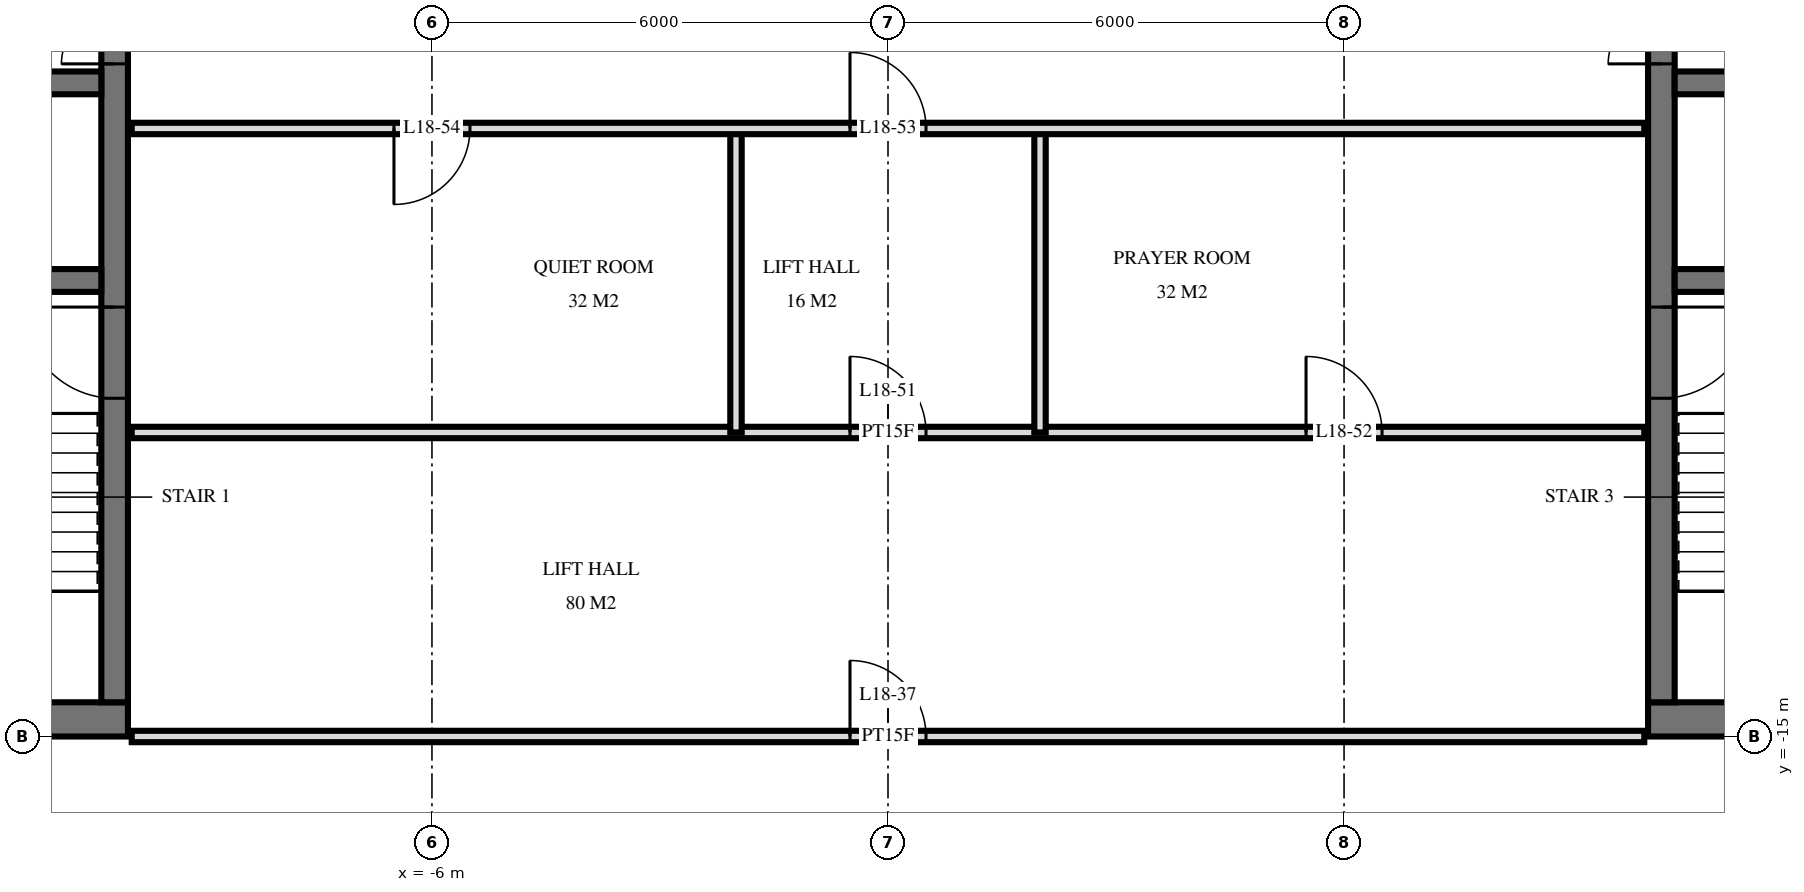
"""IFC4 building model, lengths in metres.
Left out: names, types, materials, properties, quantities, classifications, styles, units other than length and angle.
Written with IfcOpenShell. Run it as: python <this file> out.ifc"""

import sys

from ifc_helpers import new_model, si_unit, direction, frame, frame_2d, origin, place, context, subcontext, project, spatial, rectangle, extrude, element, fill, save


model = new_model("IFC4")
c1 = context("Model", 3, precision=1e-05, world=origin(), true_north=direction((0.0, 1.0)))
c2 = subcontext(c1, "Body", "Model", "MODEL_VIEW")
j1 = project(units=[si_unit("LENGTHUNIT", "METRE"), si_unit("PLANEANGLEUNIT", "RADIAN")], contexts=[c1])
p1 = place(None, origin())
s1 = spatial("IfcSite", under=j1, at=p1, CompositionType="ELEMENT")
p2 = place(p1, origin())
s2 = spatial("IfcBuilding", under=s1, at=p2, CompositionType="ELEMENT")
p3 = place(p2, frame((0.0, 0.0, 74.4)))
s3 = spatial("IfcBuildingStorey", under=s2, at=p3, CompositionType="ELEMENT", Elevation=74.4)
p4 = place(p3, frame((-29.5, -14.775, 0.0), z_axis=(0.0, 0.0, 1.0), x_axis=(1.0, 0.0, 0.0)))
e1 = element("IfcWall", 1, at=p4, inside=s3, PredefinedType="SHEAR", context=c2, shape_type="SweptSolid", body=[
    extrude(rectangle(XDim=19.5, YDim=0.45, at=frame_2d((9.75, 0.0))), origin(), (0.0, 0.0, 1.0), 3.6),
])
p5 = place(p4, frame((11.2, 0.0, 0.0)))
e2 = element("IfcOpeningElement", 2, at=p5, cuts=e1, PredefinedType="OPENING", context=c2, shape_type="SweptSolid", body=[
    extrude(rectangle(XDim=1.2, YDim=2.1, at=frame_2d((0.6, 1.05))), frame((0.0, 0.235, 0.0), z_axis=(0.0, -1.0, 0.0), x_axis=(1.0, 0.0, 0.0)), (0.0, 0.0, 1.0), 0.47),
])
p6 = place(p4, frame((14.25, 0.0, 0.0)))
e3 = element("IfcOpeningElement", 3, at=p6, cuts=e1, PredefinedType="OPENING", context=c2, shape_type="SweptSolid", body=[
    extrude(rectangle(XDim=1.1, YDim=2.1, at=frame_2d((0.55, 1.05))), frame((0.0, 0.235, 0.0), z_axis=(0.0, -1.0, 0.0), x_axis=(1.0, 0.0, 0.0)), (0.0, 0.0, 1.0), 0.47),
])
p7 = place(p4, frame((8.5, 0.0, 0.0)))
e4 = element("IfcOpeningElement", 4, at=p7, cuts=e1, PredefinedType="OPENING", context=c2, shape_type="SweptSolid", body=[
    extrude(rectangle(XDim=0.9, YDim=2.1, at=frame_2d((0.45, 1.05))), frame((0.0, 0.235, 0.0), z_axis=(0.0, -1.0, 0.0), x_axis=(1.0, 0.0, 0.0)), (0.0, 0.0, 1.0), 0.47),
])
p8 = place(p4, frame((6.05, 0.0, 0.0)))
e5 = element("IfcOpeningElement", 5, at=p8, cuts=e1, PredefinedType="OPENING", context=c2, shape_type="SweptSolid", body=[
    extrude(rectangle(XDim=1.0, YDim=2.1, at=frame_2d((0.5, 1.05))), frame((0.0, 0.235, 0.0), z_axis=(0.0, -1.0, 0.0), x_axis=(1.0, 0.0, 0.0)), (0.0, 0.0, 1.0), 0.47),
])
p9 = place(p4, frame((2.988, 0.0, 0.0)))
e6 = element("IfcOpeningElement", 6, at=p9, cuts=e1, PredefinedType="OPENING", context=c2, shape_type="SweptSolid", body=[
    extrude(rectangle(XDim=1.0, YDim=2.1, at=frame_2d((0.5, 1.05))), frame((0.0, 0.235, 0.0), z_axis=(0.0, -1.0, 0.0), x_axis=(1.0, 0.0, 0.0)), (0.0, 0.0, 1.0), 0.47),
])
p10 = place(p4, frame((0.663, 0.0, 0.0)))
e7 = element("IfcOpeningElement", 7, at=p10, cuts=e1, PredefinedType="OPENING", context=c2, shape_type="SweptSolid", body=[
    extrude(rectangle(XDim=1.0, YDim=2.1, at=frame_2d((0.5, 1.05))), frame((0.0, 0.235, 0.0), z_axis=(0.0, -1.0, 0.0), x_axis=(1.0, 0.0, 0.0)), (0.0, 0.0, 1.0), 0.47),
])
p11 = place(p3, frame((-10.175, -14.55, 0.0), z_axis=(0.0, 0.0, 1.0), x_axis=(0.0, 1.0, 0.0)))
e8 = element("IfcWall", 8, at=p11, inside=s3, PredefinedType="SHEAR", context=c2, shape_type="SweptSolid", body=[
    extrude(rectangle(XDim=14.1, YDim=0.35, at=frame_2d((7.05, 0.0))), origin(), (0.0, 0.0, 1.0), 3.6),
])
p12 = place(p11, frame((8.4, 0.0, 0.0)))
e9 = element("IfcOpeningElement", 9, at=p12, cuts=e8, PredefinedType="OPENING", context=c2, shape_type="SweptSolid", body=[
    extrude(rectangle(XDim=1.4, YDim=2.4, at=frame_2d((0.7, 1.2))), frame((0.0, 0.185, 0.0), z_axis=(0.0, -1.0, 0.0), x_axis=(1.0, 0.0, 0.0)), (0.0, 0.0, 1.0), 0.37),
])
p13 = place(p11, frame((10.0, 0.0, 0.0)))
e10 = element("IfcOpeningElement", 10, at=p13, cuts=e8, PredefinedType="OPENING", context=c2, shape_type="SweptSolid", body=[
    extrude(rectangle(XDim=1.4, YDim=2.4, at=frame_2d((0.7, 1.2))), frame((0.0, 0.185, 0.0), z_axis=(0.0, -1.0, 0.0), x_axis=(1.0, 0.0, 0.0)), (0.0, 0.0, 1.0), 0.37),
])
p14 = place(p11, frame((4.0, 0.0, 0.0)))
e11 = element("IfcOpeningElement", 11, at=p14, cuts=e8, PredefinedType="OPENING", context=c2, shape_type="SweptSolid", body=[
    extrude(rectangle(XDim=1.2, YDim=2.1, at=frame_2d((0.6, 1.05))), frame((0.0, 0.185, 0.0), z_axis=(0.0, -1.0, 0.0), x_axis=(1.0, 0.0, 0.0)), (0.0, 0.0, 1.0), 0.37),
])
p15 = place(p3, frame((-29.05, -6.4, 0.0), z_axis=(0.0, 0.0, 1.0), x_axis=(1.0, 0.0, 0.0)))
e12 = element("IfcWall", 12, at=p15, inside=s3, PredefinedType="SHEAR", context=c2, shape_type="SweptSolid", body=[
    extrude(rectangle(XDim=18.7, YDim=0.3, at=frame_2d((9.35, 0.0))), origin(), (0.0, 0.0, 1.0), 3.6),
])
p16 = place(p15, frame((2.95, 0.0, 0.0)))
e13 = element("IfcOpeningElement", 13, at=p16, cuts=e12, PredefinedType="OPENING", context=c2, shape_type="SweptSolid", body=[
    extrude(rectangle(XDim=1.1, YDim=2.1, at=frame_2d((0.55, 1.05))), frame((0.0, 0.16, 0.0), z_axis=(0.0, -1.0, 0.0), x_axis=(1.0, 0.0, 0.0)), (0.0, 0.0, 1.0), 0.32),
])
p17 = place(p15, frame((0.55, 0.0, 0.0)))
e14 = element("IfcOpeningElement", 14, at=p17, cuts=e12, PredefinedType="OPENING", context=c2, shape_type="SweptSolid", body=[
    extrude(rectangle(XDim=1.1, YDim=2.1, at=frame_2d((0.55, 1.05))), frame((0.0, 0.16, 0.0), z_axis=(0.0, -1.0, 0.0), x_axis=(1.0, 0.0, 0.0)), (0.0, 0.0, 1.0), 0.32),
])
p18 = place(p15, frame((10.8, 0.0, 0.0)))
e15 = element("IfcOpeningElement", 15, at=p18, cuts=e12, PredefinedType="OPENING", context=c2, shape_type="SweptSolid", body=[
    extrude(rectangle(XDim=1.1, YDim=2.1, at=frame_2d((0.55, 1.05))), frame((0.0, 0.16, 0.0), z_axis=(0.0, -1.0, 0.0), x_axis=(1.0, 0.0, 0.0)), (0.0, 0.0, 1.0), 0.32),
])
p19 = place(p15, frame((5.6, 0.0, 0.0)))
e16 = element("IfcOpeningElement", 16, at=p19, cuts=e12, PredefinedType="OPENING", context=c2, shape_type="SweptSolid", body=[
    extrude(rectangle(XDim=1.0, YDim=2.1, at=frame_2d((0.5, 1.05))), frame((0.0, 0.16, 0.0), z_axis=(0.0, -1.0, 0.0), x_axis=(1.0, 0.0, 0.0)), (0.0, 0.0, 1.0), 0.32),
])
p20 = place(p3, frame((-29.05, -9.0, 0.0), z_axis=(0.0, 0.0, 1.0), x_axis=(1.0, 0.0, 0.0)))
e17 = element("IfcWall", 17, at=p20, inside=s3, PredefinedType="SHEAR", context=c2, shape_type="SweptSolid", body=[
    extrude(rectangle(XDim=18.7, YDim=0.3, at=frame_2d((9.35, 0.0))), origin(), (0.0, 0.0, 1.0), 3.6),
])
p21 = place(p20, frame((13.8, 0.0, 0.0)))
e18 = element("IfcOpeningElement", 18, at=p21, cuts=e17, PredefinedType="OPENING", context=c2, shape_type="SweptSolid", body=[
    extrude(rectangle(XDim=1.1, YDim=2.1, at=frame_2d((0.55, 1.05))), frame((0.0, 0.16, 0.0), z_axis=(0.0, -1.0, 0.0), x_axis=(1.0, 0.0, 0.0)), (0.0, 0.0, 1.0), 0.32),
])
p22 = place(p3, frame((10.0, -14.775, 0.0), z_axis=(0.0, 0.0, 1.0), x_axis=(1.0, 0.0, 0.0)))
e19 = element("IfcWall", 19, at=p22, inside=s3, PredefinedType="SHEAR", context=c2, shape_type="SweptSolid", body=[
    extrude(rectangle(XDim=19.5, YDim=0.45, at=frame_2d((9.75, 0.0))), origin(), (0.0, 0.0, 1.0), 3.6),
])
p23 = place(p22, frame((7.1, 0.0, 0.0)))
e20 = element("IfcOpeningElement", 20, at=p23, cuts=e19, PredefinedType="OPENING", context=c2, shape_type="SweptSolid", body=[
    extrude(rectangle(XDim=1.2, YDim=2.1, at=frame_2d((0.6, 1.05))), frame((0.0, 0.235, 0.0), z_axis=(0.0, -1.0, 0.0), x_axis=(1.0, 0.0, 0.0)), (0.0, 0.0, 1.0), 0.47),
])
p24 = place(p22, frame((4.15, 0.0, 0.0)))
e21 = element("IfcOpeningElement", 21, at=p24, cuts=e19, PredefinedType="OPENING", context=c2, shape_type="SweptSolid", body=[
    extrude(rectangle(XDim=1.1, YDim=2.1, at=frame_2d((0.55, 1.05))), frame((0.0, 0.235, 0.0), z_axis=(0.0, -1.0, 0.0), x_axis=(1.0, 0.0, 0.0)), (0.0, 0.0, 1.0), 0.47),
])
p25 = place(p22, frame((10.1, 0.0, 0.0)))
e22 = element("IfcOpeningElement", 22, at=p25, cuts=e19, PredefinedType="OPENING", context=c2, shape_type="SweptSolid", body=[
    extrude(rectangle(XDim=0.9, YDim=2.1, at=frame_2d((0.45, 1.05))), frame((0.0, 0.235, 0.0), z_axis=(0.0, -1.0, 0.0), x_axis=(1.0, 0.0, 0.0)), (0.0, 0.0, 1.0), 0.47),
])
p26 = place(p22, frame((12.45, 0.0, 0.0)))
e23 = element("IfcOpeningElement", 23, at=p26, cuts=e19, PredefinedType="OPENING", context=c2, shape_type="SweptSolid", body=[
    extrude(rectangle(XDim=1.0, YDim=2.1, at=frame_2d((0.5, 1.05))), frame((0.0, 0.235, 0.0), z_axis=(0.0, -1.0, 0.0), x_axis=(1.0, 0.0, 0.0)), (0.0, 0.0, 1.0), 0.47),
])
p27 = place(p22, frame((15.512, 0.0, 0.0)))
e24 = element("IfcOpeningElement", 24, at=p27, cuts=e19, PredefinedType="OPENING", context=c2, shape_type="SweptSolid", body=[
    extrude(rectangle(XDim=1.0, YDim=2.1, at=frame_2d((0.5, 1.05))), frame((0.0, 0.235, 0.0), z_axis=(0.0, -1.0, 0.0), x_axis=(1.0, 0.0, 0.0)), (0.0, 0.0, 1.0), 0.47),
])
p28 = place(p22, frame((17.837, 0.0, 0.0)))
e25 = element("IfcOpeningElement", 25, at=p28, cuts=e19, PredefinedType="OPENING", context=c2, shape_type="SweptSolid", body=[
    extrude(rectangle(XDim=1.0, YDim=2.1, at=frame_2d((0.5, 1.05))), frame((0.0, 0.235, 0.0), z_axis=(0.0, -1.0, 0.0), x_axis=(1.0, 0.0, 0.0)), (0.0, 0.0, 1.0), 0.47),
])
p29 = place(p3, frame((10.175, -14.55, 0.0), z_axis=(0.0, 0.0, 1.0), x_axis=(0.0, 1.0, 0.0)))
e26 = element("IfcWall", 26, at=p29, inside=s3, PredefinedType="SHEAR", context=c2, shape_type="SweptSolid", body=[
    extrude(rectangle(XDim=14.1, YDim=0.35, at=frame_2d((7.05, 0.0))), origin(), (0.0, 0.0, 1.0), 3.6),
])
p30 = place(p29, frame((8.4, 0.0, 0.0)))
e27 = element("IfcOpeningElement", 27, at=p30, cuts=e26, PredefinedType="OPENING", context=c2, shape_type="SweptSolid", body=[
    extrude(rectangle(XDim=1.4, YDim=2.4, at=frame_2d((0.7, 1.2))), frame((0.0, 0.185, 0.0), z_axis=(0.0, -1.0, 0.0), x_axis=(1.0, 0.0, 0.0)), (0.0, 0.0, 1.0), 0.37),
])
p31 = place(p29, frame((10.0, 0.0, 0.0)))
e28 = element("IfcOpeningElement", 28, at=p31, cuts=e26, PredefinedType="OPENING", context=c2, shape_type="SweptSolid", body=[
    extrude(rectangle(XDim=1.4, YDim=2.4, at=frame_2d((0.7, 1.2))), frame((0.0, 0.185, 0.0), z_axis=(0.0, -1.0, 0.0), x_axis=(1.0, 0.0, 0.0)), (0.0, 0.0, 1.0), 0.37),
])
p32 = place(p29, frame((4.0, 0.0, 0.0)))
e29 = element("IfcOpeningElement", 29, at=p32, cuts=e26, PredefinedType="OPENING", context=c2, shape_type="SweptSolid", body=[
    extrude(rectangle(XDim=1.2, YDim=2.1, at=frame_2d((0.6, 1.05))), frame((0.0, 0.185, 0.0), z_axis=(0.0, -1.0, 0.0), x_axis=(1.0, 0.0, 0.0)), (0.0, 0.0, 1.0), 0.37),
])
p33 = place(p3, frame((10.35, -6.4, 0.0), z_axis=(0.0, 0.0, 1.0), x_axis=(1.0, 0.0, 0.0)))
e30 = element("IfcWall", 30, at=p33, inside=s3, PredefinedType="SHEAR", context=c2, shape_type="SweptSolid", body=[
    extrude(rectangle(XDim=18.7, YDim=0.3, at=frame_2d((9.35, 0.0))), origin(), (0.0, 0.0, 1.0), 3.6),
])
p34 = place(p33, frame((14.65, 0.0, 0.0)))
e31 = element("IfcOpeningElement", 31, at=p34, cuts=e30, PredefinedType="OPENING", context=c2, shape_type="SweptSolid", body=[
    extrude(rectangle(XDim=1.1, YDim=2.1, at=frame_2d((0.55, 1.05))), frame((0.0, 0.16, 0.0), z_axis=(0.0, -1.0, 0.0), x_axis=(1.0, 0.0, 0.0)), (0.0, 0.0, 1.0), 0.32),
])
p35 = place(p33, frame((17.05, 0.0, 0.0)))
e32 = element("IfcOpeningElement", 32, at=p35, cuts=e30, PredefinedType="OPENING", context=c2, shape_type="SweptSolid", body=[
    extrude(rectangle(XDim=1.1, YDim=2.1, at=frame_2d((0.55, 1.05))), frame((0.0, 0.16, 0.0), z_axis=(0.0, -1.0, 0.0), x_axis=(1.0, 0.0, 0.0)), (0.0, 0.0, 1.0), 0.32),
])
p36 = place(p33, frame((6.8, 0.0, 0.0)))
e33 = element("IfcOpeningElement", 33, at=p36, cuts=e30, PredefinedType="OPENING", context=c2, shape_type="SweptSolid", body=[
    extrude(rectangle(XDim=1.1, YDim=2.1, at=frame_2d((0.55, 1.05))), frame((0.0, 0.16, 0.0), z_axis=(0.0, -1.0, 0.0), x_axis=(1.0, 0.0, 0.0)), (0.0, 0.0, 1.0), 0.32),
])
p37 = place(p33, frame((12.1, 0.0, 0.0)))
e34 = element("IfcOpeningElement", 34, at=p37, cuts=e30, PredefinedType="OPENING", context=c2, shape_type="SweptSolid", body=[
    extrude(rectangle(XDim=1.0, YDim=2.1, at=frame_2d((0.5, 1.05))), frame((0.0, 0.16, 0.0), z_axis=(0.0, -1.0, 0.0), x_axis=(1.0, 0.0, 0.0)), (0.0, 0.0, 1.0), 0.32),
])
p38 = place(p3, frame((10.35, -9.0, 0.0), z_axis=(0.0, 0.0, 1.0), x_axis=(1.0, 0.0, 0.0)))
e35 = element("IfcWall", 35, at=p38, inside=s3, PredefinedType="SHEAR", context=c2, shape_type="SweptSolid", body=[
    extrude(rectangle(XDim=18.7, YDim=0.3, at=frame_2d((9.35, 0.0))), origin(), (0.0, 0.0, 1.0), 3.6),
])
p39 = place(p38, frame((3.8, 0.0, 0.0)))
e36 = element("IfcOpeningElement", 36, at=p39, cuts=e35, PredefinedType="OPENING", context=c2, shape_type="SweptSolid", body=[
    extrude(rectangle(XDim=1.1, YDim=2.1, at=frame_2d((0.55, 1.05))), frame((0.0, 0.16, 0.0), z_axis=(0.0, -1.0, 0.0), x_axis=(1.0, 0.0, 0.0)), (0.0, 0.0, 1.0), 0.32),
])
for number, where, z_axis, x_axis in (
    (37, (2.0, -11.0, 0.0), (0.0, 0.0, 1.0), (0.0, 1.0, 0.0)),
    (38, (-2.0, -11.0, 0.0), (0.0, 0.0, 1.0), (0.0, 1.0, 0.0)),
):
    element("IfcWall", number, at=place(p3, frame(where, z_axis=z_axis, x_axis=x_axis)), inside=s3, PredefinedType="PARTITIONING", context=c2, shape_type="SweptSolid", body=[
        extrude(rectangle(XDim=4.0, YDim=0.15, at=frame_2d((2.0, 0.0))), origin(), (0.0, 0.0, 1.0), 3.32),
    ])
p40 = place(p3, frame((-9.95, -15.0, 0.0), z_axis=(0.0, 0.0, 1.0), x_axis=(1.0, 0.0, 0.0)))
e39 = element("IfcWall", 39, at=p40, inside=s3, PredefinedType="PARTITIONING", context=c2, shape_type="SweptSolid", body=[
    extrude(rectangle(XDim=19.9, YDim=0.15, at=frame_2d((9.95, 0.0))), origin(), (0.0, 0.0, 1.0), 2.684),
])
p41 = place(p40, frame((9.45, 0.0, 0.0)))
e40 = element("IfcOpeningElement", 40, at=p41, cuts=e39, PredefinedType="OPENING", context=c2, shape_type="SweptSolid", body=[
    extrude(rectangle(XDim=1.0, YDim=2.1, at=frame_2d((0.5, 1.05))), frame((0.0, 0.085, 0.0), z_axis=(0.0, -1.0, 0.0), x_axis=(1.0, 0.0, 0.0)), (0.0, 0.0, 1.0), 0.17),
])
p42 = place(p3, frame((-9.95, -11.0, 0.0), z_axis=(0.0, 0.0, 1.0), x_axis=(1.0, 0.0, 0.0)))
e41 = element("IfcWall", 41, at=p42, inside=s3, PredefinedType="PARTITIONING", context=c2, shape_type="SweptSolid", body=[
    extrude(rectangle(XDim=19.9, YDim=0.15, at=frame_2d((9.95, 0.0))), origin(), (0.0, 0.0, 1.0), 3.32),
])
p43 = place(p42, frame((9.45, 0.0, 0.0)))
e42 = element("IfcOpeningElement", 42, at=p43, cuts=e41, PredefinedType="OPENING", context=c2, shape_type="SweptSolid", body=[
    extrude(rectangle(XDim=1.0, YDim=2.1, at=frame_2d((0.5, 1.05))), frame((0.0, 0.085, 0.0), z_axis=(0.0, -1.0, 0.0), x_axis=(1.0, 0.0, 0.0)), (0.0, 0.0, 1.0), 0.17),
])
p44 = place(p42, frame((15.45, 0.0, 0.0)))
e43 = element("IfcOpeningElement", 43, at=p44, cuts=e41, PredefinedType="OPENING", context=c2, shape_type="SweptSolid", body=[
    extrude(rectangle(XDim=1.0, YDim=2.1, at=frame_2d((0.5, 1.05))), frame((0.0, 0.085, 0.0), z_axis=(0.0, -1.0, 0.0), x_axis=(1.0, 0.0, 0.0)), (0.0, 0.0, 1.0), 0.17),
])
p45 = place(p3, frame((-9.95, -7.0, 0.0), z_axis=(0.0, 0.0, 1.0), x_axis=(1.0, 0.0, 0.0)))
e44 = element("IfcWall", 44, at=p45, inside=s3, PredefinedType="PARTITIONING", context=c2, shape_type="SweptSolid", body=[
    extrude(rectangle(XDim=19.9, YDim=0.15, at=frame_2d((9.95, 0.0))), origin(), (0.0, 0.0, 1.0), 3.32),
])
p46 = place(p45, frame((9.45, 0.0, 0.0)))
e45 = element("IfcOpeningElement", 45, at=p46, cuts=e44, PredefinedType="OPENING", context=c2, shape_type="SweptSolid", body=[
    extrude(rectangle(XDim=1.0, YDim=2.1, at=frame_2d((0.5, 1.05))), frame((0.0, 0.085, 0.0), z_axis=(0.0, -1.0, 0.0), x_axis=(1.0, 0.0, 0.0)), (0.0, 0.0, 1.0), 0.17),
])
p47 = place(p45, frame((3.45, 0.0, 0.0)))
e46 = element("IfcOpeningElement", 46, at=p47, cuts=e44, PredefinedType="OPENING", context=c2, shape_type="SweptSolid", body=[
    extrude(rectangle(XDim=1.0, YDim=2.1, at=frame_2d((0.5, 1.05))), frame((0.0, 0.085, 0.0), z_axis=(0.0, -1.0, 0.0), x_axis=(1.0, 0.0, 0.0)), (0.0, 0.0, 1.0), 0.17),
])
p48 = place(p12, origin())
e47 = element("IfcDoor", 47, at=p48, inside=s3, OperationType="DOUBLE_DOOR_SINGLE_SWING", PredefinedType="DOOR", context=c2, shape_type="SweptSolid", body=[
    extrude(rectangle(XDim=1.4, YDim=2.4, at=frame_2d((0.7, 1.2))), frame((0.0, 0.025, 0.0), z_axis=(0.0, -1.0, 0.0), x_axis=(1.0, 0.0, 0.0)), (0.0, 0.0, 1.0), 0.05),
])
fill(e9, e47)
p49 = place(p14, origin())
e48 = element("IfcDoor", 48, at=p49, inside=s3, OperationType="SINGLE_SWING_LEFT", PredefinedType="DOOR", context=c2, shape_type="SweptSolid", body=[
    extrude(rectangle(XDim=1.2, YDim=2.1, at=frame_2d((0.6, 1.05))), frame((0.0, 0.025, 0.0), z_axis=(0.0, -1.0, 0.0), x_axis=(1.0, 0.0, 0.0)), (0.0, 0.0, 1.0), 0.05),
])
fill(e11, e48)
p50 = place(p30, origin())
e49 = element("IfcDoor", 49, at=p50, inside=s3, OperationType="DOUBLE_DOOR_SINGLE_SWING", PredefinedType="DOOR", context=c2, shape_type="SweptSolid", body=[
    extrude(rectangle(XDim=1.4, YDim=2.4, at=frame_2d((0.7, 1.2))), frame((0.0, 0.025, 0.0), z_axis=(0.0, -1.0, 0.0), x_axis=(1.0, 0.0, 0.0)), (0.0, 0.0, 1.0), 0.05),
])
fill(e27, e49)
p51 = place(p32, frame((0.6, 0.0, 0.0), z_axis=(0.0, 0.0, 1.0), x_axis=(-1.0, 0.0, 0.0)))
e50 = element("IfcDoor", 50, at=p51, inside=s3, OperationType="SINGLE_SWING_RIGHT", PredefinedType="DOOR", context=c2, shape_type="SweptSolid", body=[
    extrude(rectangle(XDim=1.2, YDim=2.1, at=frame_2d((0.0, 1.05))), frame((0.0, -0.025, 0.0), z_axis=(0.0, 1.0, 0.0), x_axis=(-1.0, 0.0, 0.0)), (0.0, 0.0, 1.0), 0.05),
])
fill(e29, e50)
p52 = place(p41, origin())
e51 = element("IfcDoor", 51, at=p52, inside=s3, OperationType="SINGLE_SWING_RIGHT", PredefinedType="DOOR", context=c2, shape_type="SweptSolid", body=[
    extrude(rectangle(XDim=1.0, YDim=2.1, at=frame_2d((0.5, 1.05))), frame((0.0, 0.025, 0.0), z_axis=(0.0, -1.0, 0.0), x_axis=(1.0, 0.0, 0.0)), (0.0, 0.0, 1.0), 0.05),
])
fill(e40, e51)
p53 = place(p43, origin())
e52 = element("IfcDoor", 52, at=p53, inside=s3, OperationType="SINGLE_SWING_RIGHT", PredefinedType="DOOR", context=c2, shape_type="SweptSolid", body=[
    extrude(rectangle(XDim=1.0, YDim=2.1, at=frame_2d((0.5, 1.05))), frame((0.0, 0.025, 0.0), z_axis=(0.0, -1.0, 0.0), x_axis=(1.0, 0.0, 0.0)), (0.0, 0.0, 1.0), 0.05),
])
fill(e42, e52)
p54 = place(p44, origin())
e53 = element("IfcDoor", 53, at=p54, inside=s3, OperationType="SINGLE_SWING_RIGHT", PredefinedType="DOOR", context=c2, shape_type="SweptSolid", body=[
    extrude(rectangle(XDim=1.0, YDim=2.1, at=frame_2d((0.5, 1.05))), frame((0.0, 0.025, 0.0), z_axis=(0.0, -1.0, 0.0), x_axis=(1.0, 0.0, 0.0)), (0.0, 0.0, 1.0), 0.05),
])
fill(e43, e53)
p55 = place(p46, origin())
e54 = element("IfcDoor", 54, at=p55, inside=s3, OperationType="SINGLE_SWING_RIGHT", PredefinedType="DOOR", context=c2, shape_type="SweptSolid", body=[
    extrude(rectangle(XDim=1.0, YDim=2.1, at=frame_2d((0.5, 1.05))), frame((0.0, 0.025, 0.0), z_axis=(0.0, -1.0, 0.0), x_axis=(1.0, 0.0, 0.0)), (0.0, 0.0, 1.0), 0.05),
])
fill(e45, e54)
p56 = place(p47, frame((0.5, 0.0, 0.0), z_axis=(0.0, 0.0, 1.0), x_axis=(-1.0, 0.0, 0.0)))
e55 = element("IfcDoor", 55, at=p56, inside=s3, OperationType="SINGLE_SWING_LEFT", PredefinedType="DOOR", context=c2, shape_type="SweptSolid", body=[
    extrude(rectangle(XDim=1.0, YDim=2.1, at=frame_2d((0.0, 1.05))), frame((0.0, -0.025, 0.0), z_axis=(0.0, 1.0, 0.0), x_axis=(-1.0, 0.0, 0.0)), (0.0, 0.0, 1.0), 0.05),
])
fill(e46, e55)
save(model, sys.argv[1])
